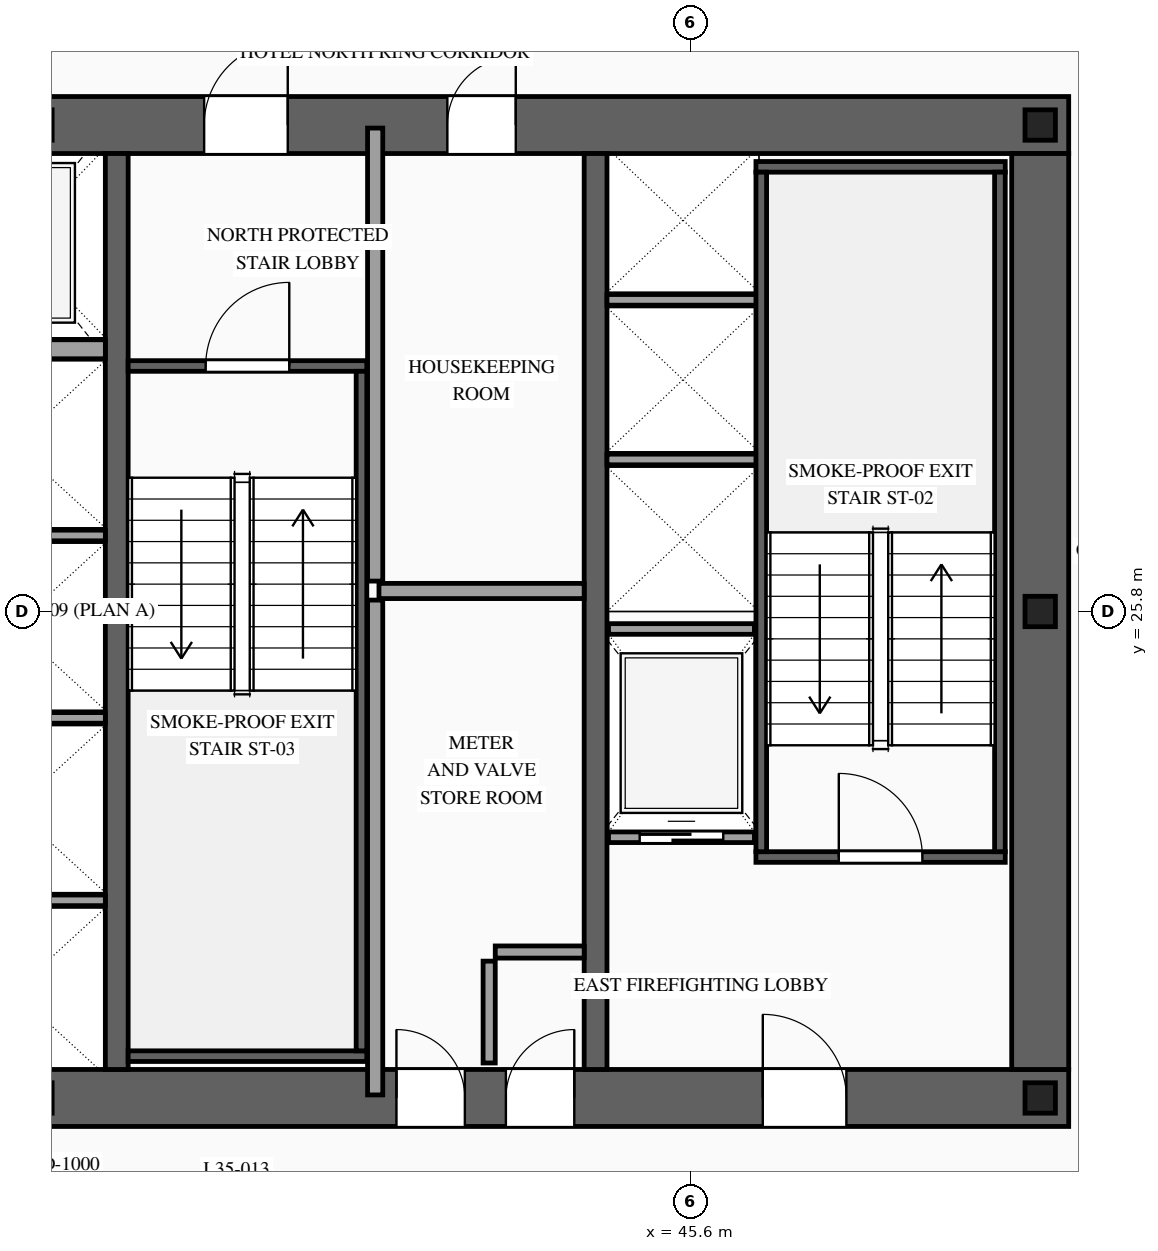
"""IFC4 building model, lengths in metres.
Left out: names, types, materials, properties, quantities, classifications, styles, units other than length and angle.
Written with IfcOpenShell. Run it as: python <this file> out.ifc"""

import sys

from ifc_helpers import new_model, si_unit, direction, frame, frame_2d, origin, origin_2d, place, context, subcontext, project, spatial, rectangle, i_section, extrude, source, transform, mapped, element, fill, save


model = new_model("IFC4")
c1 = context("Model", 3, precision=1e-05, world=origin(), true_north=direction((0.0, 1.0)))
c2 = subcontext(c1, "Body", "Model", "MODEL_VIEW")
j1 = project(units=[si_unit("LENGTHUNIT", "METRE"), si_unit("PLANEANGLEUNIT", "RADIAN")], contexts=[c1])
p1 = place(None, origin())
s1 = spatial("IfcSite", under=j1, at=p1, CompositionType="ELEMENT")
p2 = place(p1, origin())
s2 = spatial("IfcBuilding", under=s1, at=p2, CompositionType="ELEMENT")
p3 = place(p2, frame((0.0, 0.0, 134.4)))
s3 = spatial("IfcBuildingStorey", under=s2, at=p3, CompositionType="ELEMENT", Elevation=134.4)
p4 = place(p3, frame((23.425, 19.4, 0.0), z_axis=(0.0, 0.0, 1.0), x_axis=(1.0, 0.0, 0.0)))
e1 = element("IfcWall", 1, at=p4, inside=s3, PredefinedType="SHEAR", context=c2, shape_type="SweptSolid", body=[
    extrude(rectangle(XDim=27.15, YDim=0.75, at=frame_2d((13.575, 0.0))), origin(), (0.0, 0.0, 1.0), 3.6),
])
p5 = place(p4, frame((2.025, 0.0, 0.0)))
e2 = element("IfcOpeningElement", 2, at=p5, cuts=e1, PredefinedType="OPENING", context=c2, shape_type="SweptSolid", body=[
    extrude(rectangle(XDim=1.1, YDim=2.2, at=frame_2d((0.55, 1.1))), frame((0.0, 0.39, 0.0), z_axis=(0.0, -1.0, 0.0), x_axis=(1.0, 0.0, 0.0)), (0.0, 0.0, 1.0), 0.78),
])
p6 = place(p4, frame((9.925, 0.0, 0.0)))
e3 = element("IfcOpeningElement", 3, at=p6, cuts=e1, PredefinedType="OPENING", context=c2, shape_type="SweptSolid", body=[
    extrude(rectangle(XDim=1.1, YDim=2.2, at=frame_2d((0.55, 1.1))), frame((0.0, 0.39, 0.0), z_axis=(0.0, -1.0, 0.0), x_axis=(1.0, 0.0, 0.0)), (0.0, 0.0, 1.0), 0.78),
])
p7 = place(p4, frame((23.125, 0.0, 0.0)))
e4 = element("IfcOpeningElement", 4, at=p7, cuts=e1, PredefinedType="OPENING", context=c2, shape_type="SweptSolid", body=[
    extrude(rectangle(XDim=1.1, YDim=2.2, at=frame_2d((0.55, 1.1))), frame((0.0, 0.39, 0.0), z_axis=(0.0, -1.0, 0.0), x_axis=(1.0, 0.0, 0.0)), (0.0, 0.0, 1.0), 0.78),
])
p8 = place(p4, frame((19.745, 0.0, 0.0)))
e5 = element("IfcOpeningElement", 5, at=p8, cuts=e1, PredefinedType="OPENING", context=c2, shape_type="SweptSolid", body=[
    extrude(rectangle(XDim=0.9, YDim=2.15, at=frame_2d((0.45, 1.075))), frame((0.0, 0.39, 0.0), z_axis=(0.0, -1.0, 0.0), x_axis=(1.0, 0.0, 0.0)), (0.0, 0.0, 1.0), 0.78),
])
p9 = place(p4, frame((18.305, 0.0, 0.0)))
e6 = element("IfcOpeningElement", 6, at=p9, cuts=e1, PredefinedType="OPENING", context=c2, shape_type="SweptSolid", body=[
    extrude(rectangle(XDim=0.9, YDim=2.15, at=frame_2d((0.45, 1.075))), frame((0.0, 0.39, 0.0), z_axis=(0.0, -1.0, 0.0), x_axis=(1.0, 0.0, 0.0)), (0.0, 0.0, 1.0), 0.78),
])
p10 = place(p3, frame((23.425, 32.2, 0.0), z_axis=(0.0, 0.0, 1.0), x_axis=(1.0, 0.0, 0.0)))
e7 = element("IfcWall", 7, at=p10, inside=s3, PredefinedType="SHEAR", context=c2, shape_type="SweptSolid", body=[
    extrude(rectangle(XDim=27.15, YDim=0.75, at=frame_2d((13.575, 0.0))), origin(), (0.0, 0.0, 1.0), 3.6),
])
p11 = place(p10, frame((4.645, 0.0, 0.0)))
e8 = element("IfcOpeningElement", 8, at=p11, cuts=e7, PredefinedType="OPENING", context=c2, shape_type="SweptSolid", body=[
    extrude(rectangle(XDim=0.9, YDim=2.15, at=frame_2d((0.45, 1.075))), frame((0.0, 0.39, 0.0), z_axis=(0.0, -1.0, 0.0), x_axis=(1.0, 0.0, 0.0)), (0.0, 0.0, 1.0), 0.78),
])
p12 = place(p10, frame((9.925, 0.0, 0.0)))
e9 = element("IfcOpeningElement", 9, at=p12, cuts=e7, PredefinedType="OPENING", context=c2, shape_type="SweptSolid", body=[
    extrude(rectangle(XDim=1.1, YDim=2.2, at=frame_2d((0.55, 1.1))), frame((0.0, 0.39, 0.0), z_axis=(0.0, -1.0, 0.0), x_axis=(1.0, 0.0, 0.0)), (0.0, 0.0, 1.0), 0.78),
])
p13 = place(p10, frame((15.775, 0.0, 0.0)))
e10 = element("IfcOpeningElement", 10, at=p13, cuts=e7, PredefinedType="OPENING", context=c2, shape_type="SweptSolid", body=[
    extrude(rectangle(XDim=1.1, YDim=2.2, at=frame_2d((0.55, 1.1))), frame((0.0, 0.39, 0.0), z_axis=(0.0, -1.0, 0.0), x_axis=(1.0, 0.0, 0.0)), (0.0, 0.0, 1.0), 0.78),
])
p14 = place(p10, frame((18.975, 0.0, 0.0)))
e11 = element("IfcOpeningElement", 11, at=p14, cuts=e7, PredefinedType="OPENING", context=c2, shape_type="SweptSolid", body=[
    extrude(rectangle(XDim=0.9, YDim=2.15, at=frame_2d((0.45, 1.075))), frame((0.0, 0.39, 0.0), z_axis=(0.0, -1.0, 0.0), x_axis=(1.0, 0.0, 0.0)), (0.0, 0.0, 1.0), 0.78),
])
m1 = source(origin(), c2, "Body", "SweptSolid", [
    extrude(rectangle(XDim=12.05, YDim=0.75, at=frame_2d((6.025, 0.0))), origin(), (0.0, 0.0, 1.0), 3.6),
])
p15 = place(p3, frame((50.2, 19.775, 0.0), z_axis=(0.0, 0.0, 1.0), x_axis=(0.0, 1.0, 0.0)))
e12 = element("IfcWall", 12, at=p15, inside=s3, PredefinedType="SHEAR", context=c2, shape_type="MappedRepresentation", body=[
    mapped(m1, transform((0.0, 0.0, 0.0), scale=1.0)),
])
m2 = source(origin(), c2, "Body", "SweptSolid", [
    extrude(rectangle(XDim=12.05, YDim=0.3, at=frame_2d((6.025, 0.0))), origin(), (0.0, 0.0, 1.0), 3.6),
])
for number, where, z_axis, x_axis in (
    (13, (38.05, 19.775, 0.0), (0.0, 0.0, 1.0), (0.0, 1.0, 0.0)),
    (14, (44.35, 19.775, 0.0), (0.0, 0.0, 1.0), (0.0, 1.0, 0.0)),
):
    element("IfcWall", number, at=place(p3, frame(where, z_axis=z_axis, x_axis=x_axis)), inside=s3, PredefinedType="SOLIDWALL", context=c2, shape_type="MappedRepresentation", body=[
        mapped(m2, transform((0.0, 0.0, 0.0), scale=1.0)),
    ])
m3 = source(origin(), c2, "Body", "SweptSolid", [
    extrude(i_section(OverallWidth=0.4, OverallDepth=0.4, WebThickness=0.013, FlangeThickness=0.021, at=origin_2d()), origin(), (0.0, 0.0, 1.0), 3.6),
])
for number, where, z_axis, x_axis in (
    (15, (50.2, 19.4, 0.0), (0.0, 0.0, 1.0), (1.0, 0.0, 0.0)),
    (16, (50.2, 25.8, 0.0), (0.0, 0.0, 1.0), (1.0, 0.0, 0.0)),
    (17, (50.2, 32.2, 0.0), (0.0, 0.0, 1.0), (1.0, 0.0, 0.0)),
):
    element("IfcColumn", number, at=place(p3, frame(where, z_axis=z_axis, x_axis=x_axis)), inside=s3, PredefinedType="COLUMN", context=c2, shape_type="MappedRepresentation", body=[
        mapped(m3, transform((0.0, 0.0, 0.0), scale=1.0)),
    ])
p16 = place(p3, frame((44.52, 22.83, 0.0), z_axis=(0.0, 0.0, 1.0), x_axis=(1.0, 0.0, 0.0)))
e18 = element("IfcWall", 18, at=p16, inside=s3, PredefinedType="SOLIDWALL", context=c2, shape_type="SweptSolid", body=[
    extrude(rectangle(XDim=1.92, YDim=0.14, at=frame_2d((0.96, 0.0))), origin(), (0.0, 0.0, 1.0), 3.38),
])
p17 = place(p16, frame((0.41, 0.0, 0.0)))
e19 = element("IfcOpeningElement", 19, at=p17, cuts=e18, PredefinedType="OPENING", context=c2, shape_type="SweptSolid", body=[
    extrude(rectangle(XDim=1.1, YDim=2.2, at=frame_2d((0.55, 1.1))), frame((0.0, 0.085, 0.0), z_axis=(0.0, -1.0, 0.0), x_axis=(1.0, 0.0, 0.0)), (0.0, 0.0, 1.0), 0.17),
])
m4 = source(origin(), c2, "Body", "SweptSolid", [
    extrude(rectangle(XDim=1.92, YDim=0.14, at=frame_2d((0.96, 0.0))), origin(), (0.0, 0.0, 1.0), 3.38),
])
p18 = place(p3, frame((44.52, 25.57, 0.0), z_axis=(0.0, 0.0, 1.0), x_axis=(1.0, 0.0, 0.0)))
e20 = element("IfcWall", 20, at=p18, inside=s3, PredefinedType="SOLIDWALL", context=c2, shape_type="MappedRepresentation", body=[
    mapped(m4, transform((0.0, 0.0, 0.0), scale=1.0)),
])
m5 = source(origin(), c2, "Body", "SweptSolid", [
    extrude(rectangle(XDim=2.4, YDim=0.14, at=frame_2d((1.2, 0.0))), origin(), (0.0, 0.0, 1.0), 3.38),
])
for number, where, z_axis, x_axis in (
    (21, (35.5, 22.0, 0.0), (0.0, 0.0, 1.0), (1.0, 0.0, 0.0)),
    (22, (35.5, 24.4, 0.0), (0.0, 0.0, 1.0), (1.0, 0.0, 0.0)),
    (23, (35.5, 26.8, 0.0), (0.0, 0.0, 1.0), (1.0, 0.0, 0.0)),
):
    element("IfcWall", number, at=place(p3, frame(where, z_axis=z_axis, x_axis=x_axis)), inside=s3, PredefinedType="SOLIDWALL", context=c2, shape_type="MappedRepresentation", body=[
        mapped(m5, transform((0.0, 0.0, 0.0), scale=1.0)),
    ])
m6 = source(origin(), c2, "Body", "SweptSolid", [
    extrude(rectangle(XDim=2.4, YDim=0.25, at=frame_2d((1.2, 0.0))), origin(), (0.0, 0.0, 1.0), 3.38),
])
p19 = place(p3, frame((35.5, 29.25, 0.0), z_axis=(0.0, 0.0, 1.0), x_axis=(1.0, 0.0, 0.0)))
e24 = element("IfcWall", 24, at=p19, inside=s3, PredefinedType="SOLIDWALL", context=c2, shape_type="MappedRepresentation", body=[
    mapped(m6, transform((0.0, 0.0, 0.0), scale=1.0)),
])
m7 = source(origin(), c2, "Body", "SweptSolid", [
    extrude(rectangle(XDim=2.0, YDim=0.14, at=frame_2d((1.0, 0.0))), origin(), (0.0, 0.0, 1.0), 3.38),
])
for number, where, z_axis, x_axis in (
    (25, (44.5, 27.8, 0.0), (0.0, 0.0, 1.0), (1.0, 0.0, 0.0)),
    (26, (44.5, 29.9, 0.0), (0.0, 0.0, 1.0), (1.0, 0.0, 0.0)),
):
    element("IfcWall", number, at=place(p3, frame(where, z_axis=z_axis, x_axis=x_axis)), inside=s3, PredefinedType="SOLIDWALL", context=c2, shape_type="MappedRepresentation", body=[
        mapped(m7, transform((0.0, 0.0, 0.0), scale=1.0)),
    ])
p20 = place(p3, frame((46.46, 22.57, 0.0), z_axis=(0.0, 0.0, 1.0), x_axis=(1.0, 0.0, 0.0)))
e27 = element("IfcWall", 27, at=p20, inside=s3, PredefinedType="SOLIDWALL", context=c2, shape_type="SweptSolid", body=[
    extrude(rectangle(XDim=3.28, YDim=0.14, at=frame_2d((1.64, 0.0))), origin(), (0.0, 0.0, 1.0), 3.38),
])
p21 = place(p20, frame((1.09, 0.0, 0.0)))
e28 = element("IfcOpeningElement", 28, at=p21, cuts=e27, PredefinedType="OPENING", context=c2, shape_type="SweptSolid", body=[
    extrude(rectangle(XDim=1.1, YDim=2.2, at=frame_2d((0.55, 1.1))), frame((0.0, 0.085, 0.0), z_axis=(0.0, -1.0, 0.0), x_axis=(1.0, 0.0, 0.0)), (0.0, 0.0, 1.0), 0.17),
])
m8 = source(origin(), c2, "Body", "SweptSolid", [
    extrude(rectangle(XDim=3.28, YDim=0.14, at=frame_2d((1.64, 0.0))), origin(), (0.0, 0.0, 1.0), 3.38),
])
p22 = place(p3, frame((46.46, 31.65, 0.0), z_axis=(0.0, 0.0, 1.0), x_axis=(1.0, 0.0, 0.0)))
e29 = element("IfcWall", 29, at=p22, inside=s3, PredefinedType="SOLIDWALL", context=c2, shape_type="MappedRepresentation", body=[
    mapped(m8, transform((0.0, 0.0, 0.0), scale=1.0)),
])
m9 = source(origin(), c2, "Body", "SweptSolid", [
    extrude(rectangle(XDim=8.94, YDim=0.14, at=frame_2d((4.47, 0.0))), origin(), (0.0, 0.0, 1.0), 3.38),
])
for number, where, z_axis, x_axis in (
    (30, (46.53, 22.64, 0.0), (0.0, 0.0, 1.0), (0.0, 1.0, 0.0)),
    (31, (49.67, 22.64, 0.0), (0.0, 0.0, 1.0), (0.0, 1.0, 0.0)),
):
    element("IfcWall", number, at=place(p3, frame(where, z_axis=z_axis, x_axis=x_axis)), inside=s3, PredefinedType="SOLIDWALL", context=c2, shape_type="MappedRepresentation", body=[
        mapped(m9, transform((0.0, 0.0, 0.0), scale=1.0)),
    ])
p23 = place(p3, frame((38.2, 29.03, 0.0), z_axis=(0.0, 0.0, 1.0), x_axis=(1.0, 0.0, 0.0)))
e32 = element("IfcWall", 32, at=p23, inside=s3, PredefinedType="SOLIDWALL", context=c2, shape_type="SweptSolid", body=[
    extrude(rectangle(XDim=3.14, YDim=0.14, at=frame_2d((1.57, 0.0))), origin(), (0.0, 0.0, 1.0), 3.38),
])
p24 = place(p23, frame((1.02, 0.0, 0.0)))
e33 = element("IfcOpeningElement", 33, at=p24, cuts=e32, PredefinedType="OPENING", context=c2, shape_type="SweptSolid", body=[
    extrude(rectangle(XDim=1.1, YDim=2.2, at=frame_2d((0.55, 1.1))), frame((0.0, 0.085, 0.0), z_axis=(0.0, -1.0, 0.0), x_axis=(1.0, 0.0, 0.0)), (0.0, 0.0, 1.0), 0.17),
])
m10 = source(origin(), c2, "Body", "SweptSolid", [
    extrude(rectangle(XDim=3.14, YDim=0.14, at=frame_2d((1.57, 0.0))), origin(), (0.0, 0.0, 1.0), 3.38),
])
p25 = place(p3, frame((38.2, 19.95, 0.0), z_axis=(0.0, 0.0, 1.0), x_axis=(1.0, 0.0, 0.0)))
e34 = element("IfcWall", 34, at=p25, inside=s3, PredefinedType="SOLIDWALL", context=c2, shape_type="MappedRepresentation", body=[
    mapped(m10, transform((0.0, 0.0, 0.0), scale=1.0)),
])
m11 = source(origin(), c2, "Body", "SweptSolid", [
    extrude(rectangle(XDim=8.94, YDim=0.14, at=frame_2d((4.47, 0.0))), origin(), (0.0, 0.0, 1.0), 3.38),
])
p26 = place(p3, frame((41.27, 20.02, 0.0), z_axis=(0.0, 0.0, 1.0), x_axis=(0.0, 1.0, 0.0)))
e35 = element("IfcWall", 35, at=p26, inside=s3, PredefinedType="SOLIDWALL", context=c2, shape_type="MappedRepresentation", body=[
    mapped(m11, transform((0.0, 0.0, 0.0), scale=1.0)),
])
m12 = source(origin(), c2, "Body", "SweptSolid", [
    extrude(rectangle(XDim=1.34, YDim=0.16, at=frame_2d((0.67, 0.0))), origin(), (0.0, 0.0, 1.0), 3.38),
])
p27 = place(p3, frame((42.95, 19.86, 0.0), z_axis=(0.0, 0.0, 1.0), x_axis=(0.0, 1.0, 0.0)))
e36 = element("IfcWall", 36, at=p27, inside=s3, PredefinedType="PARTITIONING", context=c2, shape_type="MappedRepresentation", body=[
    mapped(m12, transform((0.0, 0.0, 0.0), scale=1.0)),
])
m13 = source(origin(), c2, "Body", "SweptSolid", [
    extrude(rectangle(XDim=1.17, YDim=0.16, at=frame_2d((0.585, 0.0))), origin(), (0.0, 0.0, 1.0), 3.38),
])
p28 = place(p3, frame((43.03, 21.32, 0.0), z_axis=(0.0, 0.0, 1.0), x_axis=(1.0, 0.0, 0.0)))
e37 = element("IfcWall", 37, at=p28, inside=s3, PredefinedType="PARTITIONING", context=c2, shape_type="MappedRepresentation", body=[
    mapped(m13, transform((0.0, 0.0, 0.0), scale=1.0)),
])
m14 = source(origin(), c2, "Body", "SweptSolid", [
    extrude(rectangle(XDim=6.51, YDim=0.2, at=frame_2d((3.255, 0.0))), origin(), (0.0, 0.0, 1.0), 3.38),
])
p29 = place(p3, frame((41.45, 19.44, 0.0), z_axis=(0.0, 0.0, 1.0), x_axis=(0.0, 1.0, 0.0)))
e38 = element("IfcWall", 38, at=p29, inside=s3, PredefinedType="PARTITIONING", context=c2, shape_type="MappedRepresentation", body=[
    mapped(m14, transform((0.0, 0.0, 0.0), scale=1.0)),
])
m15 = source(origin(), c2, "Body", "SweptSolid", [
    extrude(rectangle(XDim=2.7, YDim=0.2, at=frame_2d((1.35, 0.0))), origin(), (0.0, 0.0, 1.0), 3.38),
])
p30 = place(p3, frame((41.5, 26.07, 0.0), z_axis=(0.0, 0.0, 1.0), x_axis=(1.0, 0.0, 0.0)))
e39 = element("IfcWall", 39, at=p30, inside=s3, PredefinedType="PARTITIONING", context=c2, shape_type="MappedRepresentation", body=[
    mapped(m15, transform((0.0, 0.0, 0.0), scale=1.0)),
])
m16 = source(origin(), c2, "Body", "SweptSolid", [
    extrude(rectangle(XDim=5.96, YDim=0.2, at=frame_2d((2.98, 0.0))), origin(), (0.0, 0.0, 1.0), 3.38),
])
p31 = place(p3, frame((41.45, 26.2, 0.0), z_axis=(0.0, 0.0, 1.0), x_axis=(0.0, 1.0, 0.0)))
e40 = element("IfcWall", 40, at=p31, inside=s3, PredefinedType="PARTITIONING", context=c2, shape_type="MappedRepresentation", body=[
    mapped(m16, transform((0.0, 0.0, 0.0), scale=1.0)),
])
m17 = source(origin(), c2, "Body", "SweptSolid", [
    extrude(rectangle(XDim=1.1, YDim=2.2, at=frame_2d((0.55, 1.1))), frame((0.0, 0.025, 0.0), z_axis=(0.0, -1.0, 0.0), x_axis=(1.0, 0.0, 0.0)), (0.0, 0.0, 1.0), 0.05),
])
p32 = place(p17, origin())
e41 = element("IfcDoor", 41, at=p32, inside=s3, OperationType="SLIDING_TO_RIGHT", PredefinedType="DOOR", context=c2, shape_type="MappedRepresentation", body=[
    mapped(m17, transform((0.0, 0.0, 0.0), scale=1.0)),
])
fill(e19, e41)
m18 = source(origin(), c2, "Body", "SweptSolid", [
    extrude(rectangle(XDim=1.1, YDim=2.2, at=frame_2d((0.55, 1.1))), frame((0.0, 0.025, 0.0), z_axis=(0.0, -1.0, 0.0), x_axis=(1.0, 0.0, 0.0)), (0.0, 0.0, 1.0), 0.05),
])
p33 = place(p21, origin())
e42 = element("IfcDoor", 42, at=p33, inside=s3, OperationType="SINGLE_SWING_LEFT", PredefinedType="DOOR", context=c2, shape_type="MappedRepresentation", body=[
    mapped(m18, transform((0.0, 0.0, 0.0), scale=1.0)),
])
fill(e28, e42)
p34 = place(p24, origin())
e43 = element("IfcDoor", 43, at=p34, inside=s3, OperationType="SINGLE_SWING_RIGHT", PredefinedType="DOOR", context=c2, shape_type="MappedRepresentation", body=[
    mapped(m18, transform((0.0, 0.0, 0.0), scale=1.0)),
])
fill(e33, e43)
p35 = place(p7, origin())
e44 = element("IfcDoor", 44, at=p35, inside=s3, OperationType="SINGLE_SWING_LEFT", PredefinedType="DOOR", context=c2, shape_type="MappedRepresentation", body=[
    mapped(m18, transform((0.0, 0.0, 0.0), scale=1.0)),
])
fill(e4, e44)
p36 = place(p13, origin())
e45 = element("IfcDoor", 45, at=p36, inside=s3, OperationType="SINGLE_SWING_RIGHT", PredefinedType="DOOR", context=c2, shape_type="MappedRepresentation", body=[
    mapped(m18, transform((0.0, 0.0, 0.0), scale=1.0)),
])
fill(e10, e45)
m19 = source(origin(), c2, "Body", "SweptSolid", [
    extrude(rectangle(XDim=0.9, YDim=2.15, at=frame_2d((0.45, 1.075))), frame((0.0, 0.025, 0.0), z_axis=(0.0, -1.0, 0.0), x_axis=(1.0, 0.0, 0.0)), (0.0, 0.0, 1.0), 0.05),
])
p37 = place(p8, origin())
e46 = element("IfcDoor", 46, at=p37, inside=s3, OperationType="SINGLE_SWING_RIGHT", PredefinedType="DOOR", context=c2, shape_type="MappedRepresentation", body=[
    mapped(m19, transform((0.0, 0.0, 0.0), scale=1.0)),
])
fill(e5, e46)
p38 = place(p9, origin())
e47 = element("IfcDoor", 47, at=p38, inside=s3, OperationType="SINGLE_SWING_LEFT", PredefinedType="DOOR", context=c2, shape_type="MappedRepresentation", body=[
    mapped(m19, transform((0.0, 0.0, 0.0), scale=1.0)),
])
fill(e6, e47)
p39 = place(p14, origin())
e48 = element("IfcDoor", 48, at=p39, inside=s3, OperationType="SINGLE_SWING_RIGHT", PredefinedType="DOOR", context=c2, shape_type="MappedRepresentation", body=[
    mapped(m19, transform((0.0, 0.0, 0.0), scale=1.0)),
])
fill(e11, e48)
save(model, sys.argv[1])
